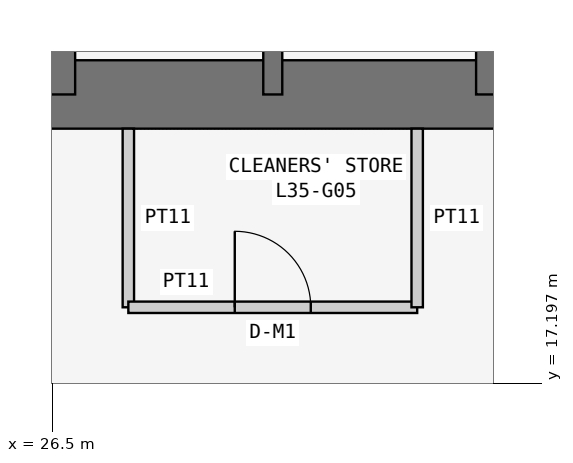
"""IFC4 building model, lengths in metres.
Left out: names, types, materials, properties, quantities, classifications, styles, units other than length and angle.
Written with IfcOpenShell. Run it as: python <this file> out.ifc"""

import sys

from ifc_helpers import new_model, si_unit, direction, frame, frame_2d, origin, place, context, subcontext, project, spatial, rectangle, extrude, element, fill, save


model = new_model("IFC4")
c1 = context("Model", 3, precision=1e-05, world=origin(), true_north=direction((0.0, 1.0)))
c2 = subcontext(c1, "Body", "Model", "MODEL_VIEW")
j1 = project(units=[si_unit("LENGTHUNIT", "METRE"), si_unit("PLANEANGLEUNIT", "RADIAN")], contexts=[c1])
p1 = place(None, origin())
s1 = spatial("IfcSite", under=j1, at=p1, CompositionType="ELEMENT")
p2 = place(p1, origin())
s2 = spatial("IfcBuilding", under=s1, at=p2, CompositionType="ELEMENT")
p3 = place(p2, frame((0.0, 0.0, 137.7)))
s3 = spatial("IfcBuildingStorey", under=s2, at=p3, CompositionType="ELEMENT", Elevation=137.7)
p4 = place(p3, frame((21.0, 21.0, 0.0), z_axis=(0.0, 0.0, 1.0), x_axis=(1.0, 0.0, 0.0)))
e1 = element("IfcWall", 1, at=p4, inside=s3, PredefinedType="SHEAR", context=c2, shape_type="SweptSolid", body=[
    extrude(rectangle(XDim=17.25, YDim=0.9, at=frame_2d((8.625, 0.0))), origin(), (0.0, 0.0, 1.0), 3.6),
])
p5 = place(p3, frame((26.6, 21.0, 0.0), z_axis=(0.0, 0.0, 1.0), x_axis=(0.0, 1.0, 0.0)))
e2 = element("IfcWall", 2, at=p5, inside=s3, PredefinedType="SHEAR", context=c2, shape_type="SweptSolid", body=[
    extrude(rectangle(XDim=16.8, YDim=0.4, at=frame_2d((8.4, 0.0))), origin(), (0.0, 0.0, 1.0), 3.6),
])
p6 = place(p5, frame((10.4, 0.0, 0.0)))
e3 = element("IfcOpeningElement", 3, at=p6, cuts=e2, PredefinedType="OPENING", context=c2, shape_type="SweptSolid", body=[
    extrude(rectangle(XDim=1.2, YDim=2.1, at=frame_2d((0.6, 1.05))), frame((0.0, 0.21, 0.0), z_axis=(0.0, -1.0, 0.0), x_axis=(1.0, 0.0, 0.0)), (0.0, 0.0, 1.0), 0.42),
])
for number, where, z_axis, x_axis in (
    (4, (29.4, 21.0, 0.0), (0.0, 0.0, 1.0), (0.0, 1.0, 0.0)),
    (5, (32.2, 21.0, 0.0), (0.0, 0.0, 1.0), (0.0, 1.0, 0.0)),
):
    element("IfcWall", number, at=place(p3, frame(where, z_axis=z_axis, x_axis=x_axis)), inside=s3, PredefinedType="SHEAR", context=c2, shape_type="SweptSolid", body=[
        extrude(rectangle(XDim=3.2, YDim=0.25, at=frame_2d((1.6, 0.0))), origin(), (0.0, 0.0, 1.0), 3.6),
    ])
p7 = place(p3, frame((27.5, 20.55, 0.0), z_axis=(0.0, 0.0, 1.0), x_axis=(0.0, -1.0, 0.0)))
e6 = element("IfcWall", 6, at=p7, inside=s3, PredefinedType="PARTITIONING", context=c2, shape_type="SweptSolid", body=[
    extrude(rectangle(XDim=2.35, YDim=0.15, at=frame_2d((1.175, 0.0))), origin(), (0.0, 0.0, 1.0), 3.45),
])
p8 = place(p3, frame((27.5, 18.2, 0.0), z_axis=(0.0, 0.0, 1.0), x_axis=(1.0, 0.0, 0.0)))
e7 = element("IfcWall", 7, at=p8, inside=s3, PredefinedType="PARTITIONING", context=c2, shape_type="SweptSolid", body=[
    extrude(rectangle(XDim=3.8, YDim=0.15, at=frame_2d((1.9, 0.0))), origin(), (0.0, 0.0, 1.0), 3.45),
])
p9 = place(p8, frame((1.4, 0.0, 0.0)))
e8 = element("IfcOpeningElement", 8, at=p9, cuts=e7, PredefinedType="OPENING", context=c2, shape_type="SweptSolid", body=[
    extrude(rectangle(XDim=1.0, YDim=2.1, at=frame_2d((0.5, 1.05))), frame((0.0, 0.085, 0.0), z_axis=(0.0, -1.0, 0.0), x_axis=(1.0, 0.0, 0.0)), (0.0, 0.0, 1.0), 0.17),
])
p10 = place(p3, frame((31.3, 18.2, 0.0), z_axis=(0.0, 0.0, 1.0), x_axis=(0.0, 1.0, 0.0)))
e9 = element("IfcWall", 9, at=p10, inside=s3, PredefinedType="PARTITIONING", context=c2, shape_type="SweptSolid", body=[
    extrude(rectangle(XDim=2.35, YDim=0.15, at=frame_2d((1.175, 0.0))), origin(), (0.0, 0.0, 1.0), 3.45),
])
p11 = place(p9, origin())
e10 = element("IfcDoor", 10, at=p11, inside=s3, OperationType="SINGLE_SWING_LEFT", PredefinedType="DOOR", context=c2, shape_type="SweptSolid", body=[
    extrude(rectangle(XDim=1.0, YDim=2.1, at=frame_2d((0.5, 1.05))), frame((0.0, 0.025, 0.0), z_axis=(0.0, -1.0, 0.0), x_axis=(1.0, 0.0, 0.0)), (0.0, 0.0, 1.0), 0.05),
])
fill(e8, e10)
save(model, sys.argv[1])
